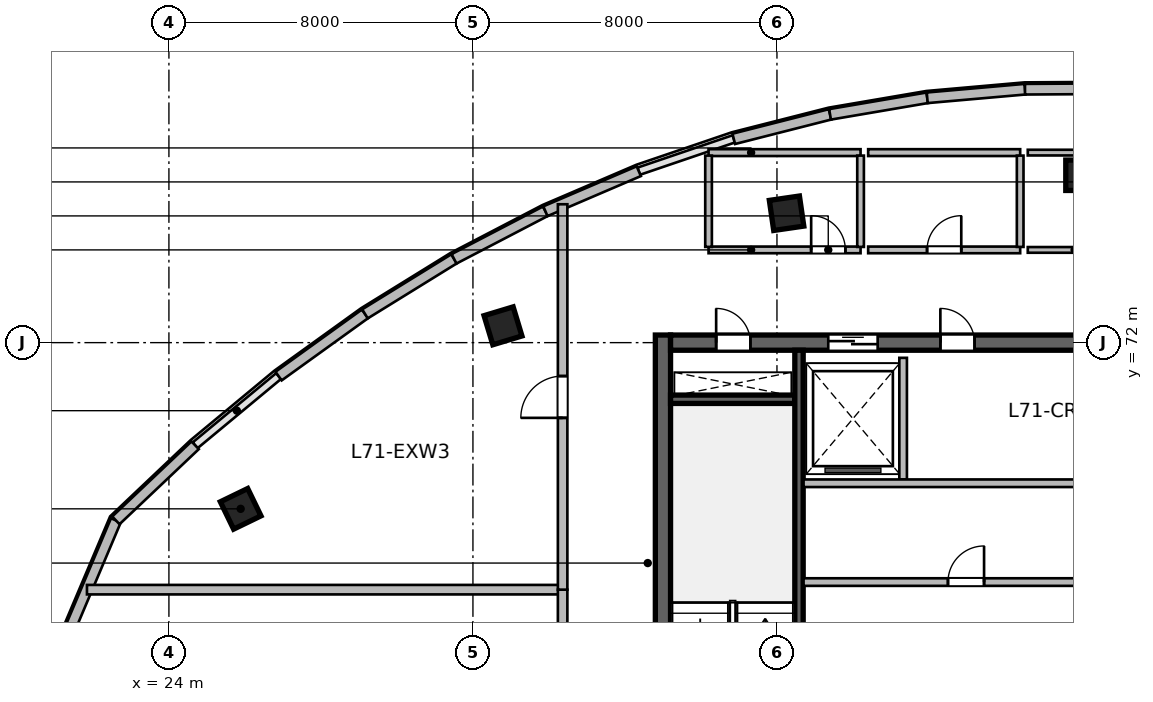
"""IFC4 building model, lengths in metres.
Left out: names, types, materials, properties, quantities, classifications, styles, units other than length and angle.
Written with IfcOpenShell. Run it as: python <this file> out.ifc"""

import sys

from ifc_helpers import new_model, si_unit, direction, frame, frame_2d, origin, origin_2d, place, context, subcontext, project, spatial, rectangle, extrude, source, transform, mapped, element, fill, save


model = new_model("IFC4")
c1 = context("Model", 3, precision=1e-05, world=origin(), true_north=direction((0.0, 1.0)))
c2 = subcontext(c1, "Body", "Model", "MODEL_VIEW")
j1 = project(units=[si_unit("LENGTHUNIT", "METRE"), si_unit("PLANEANGLEUNIT", "RADIAN")], contexts=[c1])
p1 = place(None, origin())
s1 = spatial("IfcSite", under=j1, at=p1, CompositionType="ELEMENT")
p2 = place(p1, origin())
s2 = spatial("IfcBuilding", under=s1, at=p2, CompositionType="ELEMENT")
p3 = place(p2, frame((0.0, 0.0, 291.3)))
s3 = spatial("IfcBuildingStorey", under=s2, at=p3, CompositionType="ELEMENT", Elevation=291.3)
m1 = source(origin(), c2, "Body", "SweptSolid", [
    extrude(rectangle(XDim=12.0, YDim=0.4, at=frame_2d((6.0, 0.0))), origin(), (0.0, 0.0, 1.0), 3.9),
])
p4 = place(p3, frame((37.0, 60.2, 0.0), z_axis=(0.0, 0.0, 1.0), x_axis=(0.0, 1.0, 0.0)))
e1 = element("IfcWall", 1, at=p4, inside=s3, PredefinedType="SHEAR", context=c2, shape_type="MappedRepresentation", body=[
    mapped(m1, transform((0.0, 0.0, 0.0), scale=1.0)),
])
m2 = source(origin(), c2, "Body", "SweptSolid", [
    extrude(rectangle(XDim=21.6, YDim=0.4, at=frame_2d((10.8, 0.0))), origin(), (0.0, 0.0, 1.0), 3.9),
])
p5 = place(p3, frame((37.2, 72.0, 0.0), z_axis=(0.0, 0.0, 1.0), x_axis=(1.0, 0.0, 0.0)))
e2 = element("IfcWall", 2, at=p5, inside=s3, PredefinedType="SHEAR", context=c2, shape_type="MappedRepresentation", body=[
    mapped(m2, transform((0.0, 0.0, 0.0), scale=1.0)),
])
p6 = place(p5, frame((1.2, 0.0, 0.0)))
e3 = element("IfcOpeningElement", 3, at=p6, cuts=e2, PredefinedType="OPENING", context=c2, shape_type="SweptSolid", body=[
    extrude(rectangle(XDim=0.9, YDim=2.1, at=frame_2d((0.45, 1.05))), frame((0.0, 0.21, 0.0), z_axis=(0.0, -1.0, 0.0), x_axis=(1.0, 0.0, 0.0)), (0.0, 0.0, 1.0), 0.42),
])
p7 = place(p5, frame((14.7, 0.0, 0.0)))
e4 = element("IfcOpeningElement", 4, at=p7, cuts=e2, PredefinedType="OPENING", context=c2, shape_type="SweptSolid", body=[
    extrude(rectangle(XDim=1.2, YDim=2.15, at=frame_2d((0.6, 1.075))), frame((0.0, 0.21, 0.0), z_axis=(0.0, -1.0, 0.0), x_axis=(1.0, 0.0, 0.0)), (0.0, 0.0, 1.0), 0.42),
])
p8 = place(p5, frame((4.15, 0.0, 0.0)))
e5 = element("IfcOpeningElement", 5, at=p8, cuts=e2, PredefinedType="OPENING", context=c2, shape_type="SweptSolid", body=[
    extrude(rectangle(XDim=1.3, YDim=2.15, at=frame_2d((0.65, 1.075))), frame((0.0, 0.21, 0.0), z_axis=(0.0, -1.0, 0.0), x_axis=(1.0, 0.0, 0.0)), (0.0, 0.0, 1.0), 0.42),
])
p9 = place(p5, frame((7.1, 0.0, 0.0)))
e6 = element("IfcOpeningElement", 6, at=p9, cuts=e2, PredefinedType="OPENING", context=c2, shape_type="SweptSolid", body=[
    extrude(rectangle(XDim=0.9, YDim=2.1, at=frame_2d((0.45, 1.05))), frame((0.0, 0.21, 0.0), z_axis=(0.0, -1.0, 0.0), x_axis=(1.0, 0.0, 0.0)), (0.0, 0.0, 1.0), 0.42),
])
m3 = source(origin(), c2, "Body", "SweptSolid", [
    extrude(rectangle(XDim=3.27, YDim=0.22, at=frame_2d((1.635, 0.0))), origin(), (0.0, 0.0, 1.0), 3.9),
])
p10 = place(p3, frame((37.2, 70.51, 0.0), z_axis=(0.0, 0.0, 1.0), x_axis=(1.0, 0.0, 0.0)))
e7 = element("IfcWall", 7, at=p10, inside=s3, PredefinedType="SHEAR", context=c2, shape_type="MappedRepresentation", body=[
    mapped(m3, transform((0.0, 0.0, 0.0), scale=1.0)),
])
m4 = source(origin(), c2, "Body", "SweptSolid", [
    extrude(rectangle(XDim=11.2, YDim=0.22, at=frame_2d((5.6, 0.0))), origin(), (0.0, 0.0, 1.0), 3.9),
])
p11 = place(p3, frame((40.58, 60.6, 0.0), z_axis=(0.0, 0.0, 1.0), x_axis=(0.0, 1.0, 0.0)))
e8 = element("IfcWall", 8, at=p11, inside=s3, PredefinedType="SHEAR", context=c2, shape_type="MappedRepresentation", body=[
    mapped(m4, transform((0.0, 0.0, 0.0), scale=1.0)),
])
m5 = source(origin(), c2, "Body", "SweptSolid", [
    extrude(rectangle(XDim=0.8, YDim=0.8, at=origin_2d()), origin(), (0.0, 0.0, 1.0), 3.9),
])
for number, where, z_axis, x_axis in (
    (9, (25.888, 67.627, 0.0), (0.0, 0.0, 1.0), (-0.436, 0.9, 0.0)),
    (10, (32.791, 72.442, 0.0), (0.0, 0.0, 1.0), (-0.289, 0.957, 0.0)),
    (11, (40.253, 75.404, 0.0), (0.0, 0.0, 1.0), (-0.143, 0.99, 0.0)),
    (12, (48.0, 76.404, 0.0), (0.0, 0.0, 1.0), (0.0, 1.0, 0.0)),
):
    element("IfcColumn", number, at=place(p3, frame(where, z_axis=z_axis, x_axis=x_axis)), inside=s3, PredefinedType="COLUMN", context=c2, shape_type="MappedRepresentation", body=[
        mapped(m5, transform((0.0, 0.0, 0.0), scale=1.0)),
    ])
m6 = source(origin(), c2, "Body", "SweptSolid", [
    extrude(rectangle(XDim=5.655, YDim=0.28, at=frame_2d((2.828, 0.0))), origin(), (0.0, 0.0, 1.0), 3.64),
])
p12 = place(p3, frame((20.401, 62.116, 0.0), z_axis=(0.0, 0.0, 1.0), x_axis=(0.389585063528, 0.920990487614, 0.0)))
e13 = element("IfcWall", 13, at=p12, inside=s3, PredefinedType="SOLIDWALL", context=c2, shape_type="MappedRepresentation", body=[
    mapped(m6, transform((0.0, 0.0, 0.0), scale=1.0)),
])
p13 = place(p12, frame((0.314, 0.0, 0.95)))
e14 = element("IfcOpeningElement", 14, at=p13, cuts=e13, PredefinedType="OPENING", context=c2, shape_type="SweptSolid", body=[
    extrude(rectangle(XDim=2.2, YDim=2.1, at=frame_2d((1.1, 1.05))), frame((0.0, 0.15, 0.0), z_axis=(0.0, -1.0, 0.0), x_axis=(1.0, 0.0, 0.0)), (0.0, 0.0, 1.0), 0.3),
])
m7 = source(origin(), c2, "Body", "SweptSolid", [
    extrude(rectangle(XDim=2.873, YDim=0.28, at=frame_2d((1.436, 0.0))), origin(), (0.0, 0.0, 1.0), 3.64),
])
p14 = place(p3, frame((22.604, 67.324, 0.0), z_axis=(0.0, 0.0, 1.0), x_axis=(0.72609560544, 0.687593754888, 0.0)))
e15 = element("IfcWall", 15, at=p14, inside=s3, PredefinedType="SOLIDWALL", context=c2, shape_type="MappedRepresentation", body=[
    mapped(m7, transform((0.0, 0.0, 0.0), scale=1.0)),
])
m8 = source(origin(), c2, "Body", "SweptSolid", [
    extrude(rectangle(XDim=2.802, YDim=0.28, at=frame_2d((1.401, 0.0))), origin(), (0.0, 0.0, 1.0), 3.64),
])
p15 = place(p3, frame((26.885, 71.12, 0.0), z_axis=(0.0, 0.0, 1.0), x_axis=(0.811507896482, 0.584341453217, 0.0)))
e16 = element("IfcWall", 16, at=p15, inside=s3, PredefinedType="SOLIDWALL", context=c2, shape_type="MappedRepresentation", body=[
    mapped(m8, transform((0.0, 0.0, 0.0), scale=1.0)),
])
m9 = source(origin(), c2, "Body", "SweptSolid", [
    extrude(rectangle(XDim=2.755, YDim=0.28, at=frame_2d((1.377, 0.0))), origin(), (0.0, 0.0, 1.0), 3.64),
])
p16 = place(p3, frame((29.159, 72.757, 0.0), z_axis=(0.0, 0.0, 1.0), x_axis=(0.850750210743, 0.525570241661, 0.0)))
e17 = element("IfcWall", 17, at=p16, inside=s3, PredefinedType="SOLIDWALL", context=c2, shape_type="MappedRepresentation", body=[
    mapped(m9, transform((0.0, 0.0, 0.0), scale=1.0)),
])
m10 = source(origin(), c2, "Body", "SweptSolid", [
    extrude(rectangle(XDim=2.711, YDim=0.28, at=frame_2d((1.356, 0.0))), origin(), (0.0, 0.0, 1.0), 3.64),
])
p17 = place(p3, frame((31.502, 74.205, 0.0), z_axis=(0.0, 0.0, 1.0), x_axis=(0.886828760751, 0.462098202881, 0.0)))
e18 = element("IfcWall", 18, at=p17, inside=s3, PredefinedType="SOLIDWALL", context=c2, shape_type="MappedRepresentation", body=[
    mapped(m10, transform((0.0, 0.0, 0.0), scale=1.0)),
])
m11 = source(origin(), c2, "Body", "SweptSolid", [
    extrude(rectangle(XDim=2.673, YDim=0.28, at=frame_2d((1.337, 0.0))), origin(), (0.0, 0.0, 1.0), 3.64),
])
p18 = place(p3, frame((33.907, 75.458, 0.0), z_axis=(0.0, 0.0, 1.0), x_axis=(0.919036345912, 0.394172798266, 0.0)))
e19 = element("IfcWall", 19, at=p18, inside=s3, PredefinedType="SOLIDWALL", context=c2, shape_type="MappedRepresentation", body=[
    mapped(m11, transform((0.0, 0.0, 0.0), scale=1.0)),
])
m12 = source(origin(), c2, "Body", "SweptSolid", [
    extrude(rectangle(XDim=2.614, YDim=0.28, at=frame_2d((1.307, 0.0))), origin(), (0.0, 0.0, 1.0), 3.64),
])
p19 = place(p3, frame((38.863, 77.362, 0.0), z_axis=(0.0, 0.0, 1.0), x_axis=(0.969106509315, 0.246642602978, 0.0)))
e20 = element("IfcWall", 20, at=p19, inside=s3, PredefinedType="SOLIDWALL", context=c2, shape_type="MappedRepresentation", body=[
    mapped(m12, transform((0.0, 0.0, 0.0), scale=1.0)),
])
m13 = source(origin(), c2, "Body", "SweptSolid", [
    extrude(rectangle(XDim=2.594, YDim=0.28, at=frame_2d((1.297, 0.0))), origin(), (0.0, 0.0, 1.0), 3.64),
])
p20 = place(p3, frame((41.397, 78.007, 0.0), z_axis=(0.0, 0.0, 1.0), x_axis=(0.985792341502, 0.167968626344, 0.0)))
e21 = element("IfcWall", 21, at=p20, inside=s3, PredefinedType="SOLIDWALL", context=c2, shape_type="MappedRepresentation", body=[
    mapped(m13, transform((0.0, 0.0, 0.0), scale=1.0)),
])
m14 = source(origin(), c2, "Body", "SweptSolid", [
    extrude(rectangle(XDim=2.583, YDim=0.28, at=frame_2d((1.291, 0.0))), origin(), (0.0, 0.0, 1.0), 3.64),
])
p21 = place(p3, frame((43.954, 78.442, 0.0), z_axis=(0.0, 0.0, 1.0), x_axis=(0.996168946569, 0.087449584851, 0.0)))
e22 = element("IfcWall", 22, at=p21, inside=s3, PredefinedType="SOLIDWALL", context=c2, shape_type="MappedRepresentation", body=[
    mapped(m14, transform((0.0, 0.0, 0.0), scale=1.0)),
])
m15 = source(origin(), c2, "Body", "SweptSolid", [
    extrude(rectangle(XDim=2.578, YDim=0.28, at=frame_2d((1.289, 0.0))), origin(), (0.0, 0.0, 1.0), 3.64),
])
p22 = place(p3, frame((46.527, 78.668, 0.0), z_axis=(0.0, 0.0, 1.0), x_axis=(0.999982204439, 0.005965802924, 0.0)))
e23 = element("IfcWall", 23, at=p22, inside=s3, PredefinedType="SOLIDWALL", context=c2, shape_type="MappedRepresentation", body=[
    mapped(m15, transform((0.0, 0.0, 0.0), scale=1.0)),
])
m16 = source(origin(), c2, "Body", "SweptSolid", [
    extrude(rectangle(XDim=3.2, YDim=0.2, at=frame_2d((1.6, 0.0))), origin(), (0.0, 0.0, 1.0), 3.64),
])
p23 = place(p3, frame((43.32, 68.4, 0.0), z_axis=(0.0, 0.0, 1.0), x_axis=(0.0, 1.0, 0.0)))
e24 = element("IfcWall", 24, at=p23, inside=s3, PredefinedType="SOLIDWALL", context=c2, shape_type="MappedRepresentation", body=[
    mapped(m16, transform((0.0, 0.0, 0.0), scale=1.0)),
])
m17 = source(origin(), c2, "Body", "SweptSolid", [
    extrude(rectangle(XDim=8.8, YDim=0.2, at=frame_2d((4.4, 0.0))), origin(), (0.0, 0.0, 1.0), 3.64),
])
p24 = place(p3, frame((40.7, 68.3, 0.0), z_axis=(0.0, 0.0, 1.0), x_axis=(1.0, 0.0, 0.0)))
e25 = element("IfcWall", 25, at=p24, inside=s3, PredefinedType="SOLIDWALL", context=c2, shape_type="MappedRepresentation", body=[
    mapped(m17, transform((0.0, 0.0, 0.0), scale=1.0)),
])
p25 = place(p3, frame((40.7, 65.7, 0.0), z_axis=(0.0, 0.0, 1.0), x_axis=(1.0, 0.0, 0.0)))
e26 = element("IfcWall", 26, at=p25, inside=s3, PredefinedType="SOLIDWALL", context=c2, shape_type="MappedRepresentation", body=[
    mapped(m17, transform((0.0, 0.0, 0.0), scale=1.0)),
])
p26 = place(p25, frame((3.8, 0.0, 0.0)))
e27 = element("IfcOpeningElement", 27, at=p26, cuts=e26, PredefinedType="OPENING", context=c2, shape_type="SweptSolid", body=[
    extrude(rectangle(XDim=0.95, YDim=2.15, at=frame_2d((0.475, 1.075))), frame((0.0, 0.11, 0.0), z_axis=(0.0, -1.0, 0.0), x_axis=(1.0, 0.0, 0.0)), (0.0, 0.0, 1.0), 0.22),
])
m18 = source(origin(), c2, "Body", "SweptSolid", [
    extrude(rectangle(XDim=4.0, YDim=0.175, at=frame_2d((2.0, 0.0))), origin(), (0.0, 0.0, 1.0), 3.64),
])
p27 = place(p3, frame((38.2, 74.44, 0.0), z_axis=(0.0, 0.0, 1.0), x_axis=(1.0, 0.0, 0.0)))
e28 = element("IfcWall", 28, at=p27, inside=s3, PredefinedType="PARTITIONING", context=c2, shape_type="MappedRepresentation", body=[
    mapped(m18, transform((0.0, 0.0, 0.0), scale=1.0)),
])
p28 = place(p27, frame((2.7, 0.0, 0.0)))
e29 = element("IfcOpeningElement", 29, at=p28, cuts=e28, PredefinedType="OPENING", context=c2, shape_type="SweptSolid", body=[
    extrude(rectangle(XDim=0.9, YDim=2.08, at=frame_2d((0.45, 1.04))), frame((0.0, 0.098, 0.0), z_axis=(0.0, -1.0, 0.0), x_axis=(1.0, 0.0, 0.0)), (0.0, 0.0, 1.0), 0.195),
])
m19 = source(origin(), c2, "Body", "SweptSolid", [
    extrude(rectangle(XDim=4.0, YDim=0.18, at=frame_2d((2.0, 0.0))), origin(), (0.0, 0.0, 1.0), 3.64),
])
p29 = place(p3, frame((38.2, 77.0, 0.0), z_axis=(0.0, 0.0, 1.0), x_axis=(1.0, 0.0, 0.0)))
e30 = element("IfcWall", 30, at=p29, inside=s3, PredefinedType="PLUMBINGWALL", context=c2, shape_type="MappedRepresentation", body=[
    mapped(m19, transform((0.0, 0.0, 0.0), scale=1.0)),
])
m20 = source(origin(), c2, "Body", "SweptSolid", [
    extrude(rectangle(XDim=2.403, YDim=0.175, at=frame_2d((1.201, 0.0))), origin(), (0.0, 0.0, 1.0), 3.64),
])
for number, where, z_axis, x_axis in (
    (31, (38.2, 74.519, 0.0), (0.0, 0.0, 1.0), (0.0, 1.0, 0.0)),
    (32, (42.2, 74.519, 0.0), (0.0, 0.0, 1.0), (0.0, 1.0, 0.0)),
):
    element("IfcWall", number, at=place(p3, frame(where, z_axis=z_axis, x_axis=x_axis)), inside=s3, PredefinedType="PARTITIONING", context=c2, shape_type="MappedRepresentation", body=[
        mapped(m20, transform((0.0, 0.0, 0.0), scale=1.0)),
    ])
p30 = place(p3, frame((42.4, 74.44, 0.0), z_axis=(0.0, 0.0, 1.0), x_axis=(1.0, 0.0, 0.0)))
e33 = element("IfcWall", 33, at=p30, inside=s3, PredefinedType="PARTITIONING", context=c2, shape_type="MappedRepresentation", body=[
    mapped(m18, transform((0.0, 0.0, 0.0), scale=1.0)),
])
p31 = place(p30, frame((1.55, 0.0, 0.0)))
e34 = element("IfcOpeningElement", 34, at=p31, cuts=e33, PredefinedType="OPENING", context=c2, shape_type="SweptSolid", body=[
    extrude(rectangle(XDim=0.9, YDim=2.08, at=frame_2d((0.45, 1.04))), frame((0.0, 0.098, 0.0), z_axis=(0.0, -1.0, 0.0), x_axis=(1.0, 0.0, 0.0)), (0.0, 0.0, 1.0), 0.195),
])
p32 = place(p3, frame((42.4, 77.0, 0.0), z_axis=(0.0, 0.0, 1.0), x_axis=(1.0, 0.0, 0.0)))
e35 = element("IfcWall", 35, at=p32, inside=s3, PredefinedType="PLUMBINGWALL", context=c2, shape_type="MappedRepresentation", body=[
    mapped(m19, transform((0.0, 0.0, 0.0), scale=1.0)),
])
p33 = place(p3, frame((46.4, 74.519, 0.0), z_axis=(0.0, 0.0, 1.0), x_axis=(0.0, 1.0, 0.0)))
e36 = element("IfcWall", 36, at=p33, inside=s3, PredefinedType="PARTITIONING", context=c2, shape_type="MappedRepresentation", body=[
    mapped(m20, transform((0.0, 0.0, 0.0), scale=1.0)),
])
m21 = source(origin(), c2, "Body", "SweptSolid", [
    extrude(rectangle(XDim=4.4, YDim=0.15, at=frame_2d((2.2, 0.0))), origin(), (0.0, 0.0, 1.0), 3.64),
])
p34 = place(p3, frame((46.6, 74.44, 0.0), z_axis=(0.0, 0.0, 1.0), x_axis=(1.0, 0.0, 0.0)))
e37 = element("IfcWall", 37, at=p34, inside=s3, PredefinedType="PARTITIONING", context=c2, shape_type="MappedRepresentation", body=[
    mapped(m21, transform((0.0, 0.0, 0.0), scale=1.0)),
])
p35 = place(p34, frame((1.725, 0.0, 0.0)))
e38 = element("IfcOpeningElement", 38, at=p35, cuts=e37, PredefinedType="OPENING", context=c2, shape_type="SweptSolid", body=[
    extrude(rectangle(XDim=0.95, YDim=2.1, at=frame_2d((0.475, 1.05))), frame((0.0, 0.085, 0.0), z_axis=(0.0, -1.0, 0.0), x_axis=(1.0, 0.0, 0.0)), (0.0, 0.0, 1.0), 0.17),
])
p36 = place(p3, frame((46.6, 77.0, 0.0), z_axis=(0.0, 0.0, 1.0), x_axis=(1.0, 0.0, 0.0)))
e39 = element("IfcWall", 39, at=p36, inside=s3, PredefinedType="PARTITIONING", context=c2, shape_type="MappedRepresentation", body=[
    mapped(m21, transform((0.0, 0.0, 0.0), scale=1.0)),
])
m22 = source(origin(), c2, "Body", "SweptSolid", [
    extrude(rectangle(XDim=12.517, YDim=0.25, at=frame_2d((6.258, 0.0))), origin(), (0.0, 0.0, 1.0), 3.64),
])
p37 = place(p3, frame((21.844, 65.5, 0.0), z_axis=(0.0, 0.0, 1.0), x_axis=(1.0, 0.0, 0.0)))
e40 = element("IfcWall", 40, at=p37, inside=s3, PredefinedType="PARTITIONING", context=c2, shape_type="MappedRepresentation", body=[
    mapped(m22, transform((0.0, 0.0, 0.0), scale=1.0)),
])
m23 = source(origin(), c2, "Body", "SweptSolid", [
    extrude(rectangle(XDim=6.0, YDim=0.25, at=frame_2d((3.0, 0.0))), origin(), (0.0, 0.0, 1.0), 3.64),
])
p38 = place(p3, frame((34.36, 59.5, 0.0), z_axis=(0.0, 0.0, 1.0), x_axis=(0.0, 1.0, 0.0)))
e41 = element("IfcWall", 41, at=p38, inside=s3, PredefinedType="PARTITIONING", context=c2, shape_type="MappedRepresentation", body=[
    mapped(m23, transform((0.0, 0.0, 0.0), scale=1.0)),
])
p39 = place(p38, frame((2.45, 0.0, 0.0)))
e42 = element("IfcOpeningElement", 42, at=p39, cuts=e41, PredefinedType="OPENING", context=c2, shape_type="SweptSolid", body=[
    extrude(rectangle(XDim=1.1, YDim=2.15, at=frame_2d((0.55, 1.075))), frame((0.0, 0.135, 0.0), z_axis=(0.0, -1.0, 0.0), x_axis=(1.0, 0.0, 0.0)), (0.0, 0.0, 1.0), 0.27),
])
m24 = source(origin(), c2, "Body", "SweptSolid", [
    extrude(rectangle(XDim=10.141, YDim=0.25, at=frame_2d((5.07, 0.0))), origin(), (0.0, 0.0, 1.0), 3.64),
])
p40 = place(p3, frame((34.36, 65.5, 0.0), z_axis=(0.0, 0.0, 1.0), x_axis=(0.0, 1.0, 0.0)))
e43 = element("IfcWall", 43, at=p40, inside=s3, PredefinedType="PARTITIONING", context=c2, shape_type="MappedRepresentation", body=[
    mapped(m24, transform((0.0, 0.0, 0.0), scale=1.0)),
])
p41 = place(p40, frame((4.521, 0.0, 0.0)))
e44 = element("IfcOpeningElement", 44, at=p41, cuts=e43, PredefinedType="OPENING", context=c2, shape_type="SweptSolid", body=[
    extrude(rectangle(XDim=1.1, YDim=2.15, at=frame_2d((0.55, 1.075))), frame((0.0, 0.135, 0.0), z_axis=(0.0, -1.0, 0.0), x_axis=(1.0, 0.0, 0.0)), (0.0, 0.0, 1.0), 0.27),
])
m25 = source(origin(), c2, "Body", "SweptSolid", [
    extrude(rectangle(XDim=0.9, YDim=2.1, at=frame_2d((0.45, 1.05))), frame((0.0, 0.025, 0.0), z_axis=(0.0, -1.0, 0.0), x_axis=(1.0, 0.0, 0.0)), (0.0, 0.0, 1.0), 0.05),
])
p42 = place(p6, origin())
e45 = element("IfcDoor", 45, at=p42, inside=s3, OperationType="SINGLE_SWING_LEFT", PredefinedType="DOOR", context=c2, shape_type="MappedRepresentation", body=[
    mapped(m25, transform((0.0, 0.0, 0.0), scale=1.0)),
])
fill(e3, e45)
m26 = source(origin(), c2, "Body", "SweptSolid", [
    extrude(rectangle(XDim=1.3, YDim=2.15, at=frame_2d((0.65, 1.075))), frame((0.0, 0.025, 0.0), z_axis=(0.0, -1.0, 0.0), x_axis=(1.0, 0.0, 0.0)), (0.0, 0.0, 1.0), 0.05),
])
p43 = place(p8, origin())
e46 = element("IfcDoor", 46, at=p43, inside=s3, OperationType="DOUBLE_DOOR_SLIDING", PredefinedType="DOOR", context=c2, shape_type="MappedRepresentation", body=[
    mapped(m26, transform((0.0, 0.0, 0.0), scale=1.0)),
])
fill(e5, e46)
p44 = place(p9, origin())
e47 = element("IfcDoor", 47, at=p44, inside=s3, OperationType="SINGLE_SWING_LEFT", PredefinedType="DOOR", context=c2, shape_type="MappedRepresentation", body=[
    mapped(m25, transform((0.0, 0.0, 0.0), scale=1.0)),
])
fill(e6, e47)
m27 = source(origin(), c2, "Body", "SweptSolid", [
    extrude(rectangle(XDim=0.95, YDim=2.15, at=frame_2d((0.475, 1.075))), frame((0.0, 0.025, 0.0), z_axis=(0.0, -1.0, 0.0), x_axis=(1.0, 0.0, 0.0)), (0.0, 0.0, 1.0), 0.05),
])
p45 = place(p26, origin())
e48 = element("IfcDoor", 48, at=p45, inside=s3, OperationType="SINGLE_SWING_RIGHT", PredefinedType="DOOR", context=c2, shape_type="MappedRepresentation", body=[
    mapped(m27, transform((0.0, 0.0, 0.0), scale=1.0)),
])
fill(e27, e48)
m28 = source(origin(), c2, "Body", "SweptSolid", [
    extrude(rectangle(XDim=0.9, YDim=2.08, at=frame_2d((0.45, 1.04))), frame((0.0, 0.025, 0.0), z_axis=(0.0, -1.0, 0.0), x_axis=(1.0, 0.0, 0.0)), (0.0, 0.0, 1.0), 0.05),
])
p46 = place(p28, origin())
e49 = element("IfcDoor", 49, at=p46, inside=s3, OperationType="SINGLE_SWING_LEFT", PredefinedType="DOOR", context=c2, shape_type="MappedRepresentation", body=[
    mapped(m28, transform((0.0, 0.0, 0.0), scale=1.0)),
])
fill(e29, e49)
p47 = place(p31, origin())
e50 = element("IfcDoor", 50, at=p47, inside=s3, OperationType="SINGLE_SWING_RIGHT", PredefinedType="DOOR", context=c2, shape_type="MappedRepresentation", body=[
    mapped(m28, transform((0.0, 0.0, 0.0), scale=1.0)),
])
fill(e34, e50)
m29 = source(origin(), c2, "Body", "SweptSolid", [
    extrude(rectangle(XDim=1.1, YDim=2.15, at=frame_2d((0.55, 1.075))), frame((0.0, 0.025, 0.0), z_axis=(0.0, -1.0, 0.0), x_axis=(1.0, 0.0, 0.0)), (0.0, 0.0, 1.0), 0.05),
])
p48 = place(p41, origin())
e51 = element("IfcDoor", 51, at=p48, inside=s3, OperationType="SINGLE_SWING_LEFT", PredefinedType="DOOR", context=c2, shape_type="MappedRepresentation", body=[
    mapped(m29, transform((0.0, 0.0, 0.0), scale=1.0)),
])
fill(e44, e51)
save(model, sys.argv[1])
